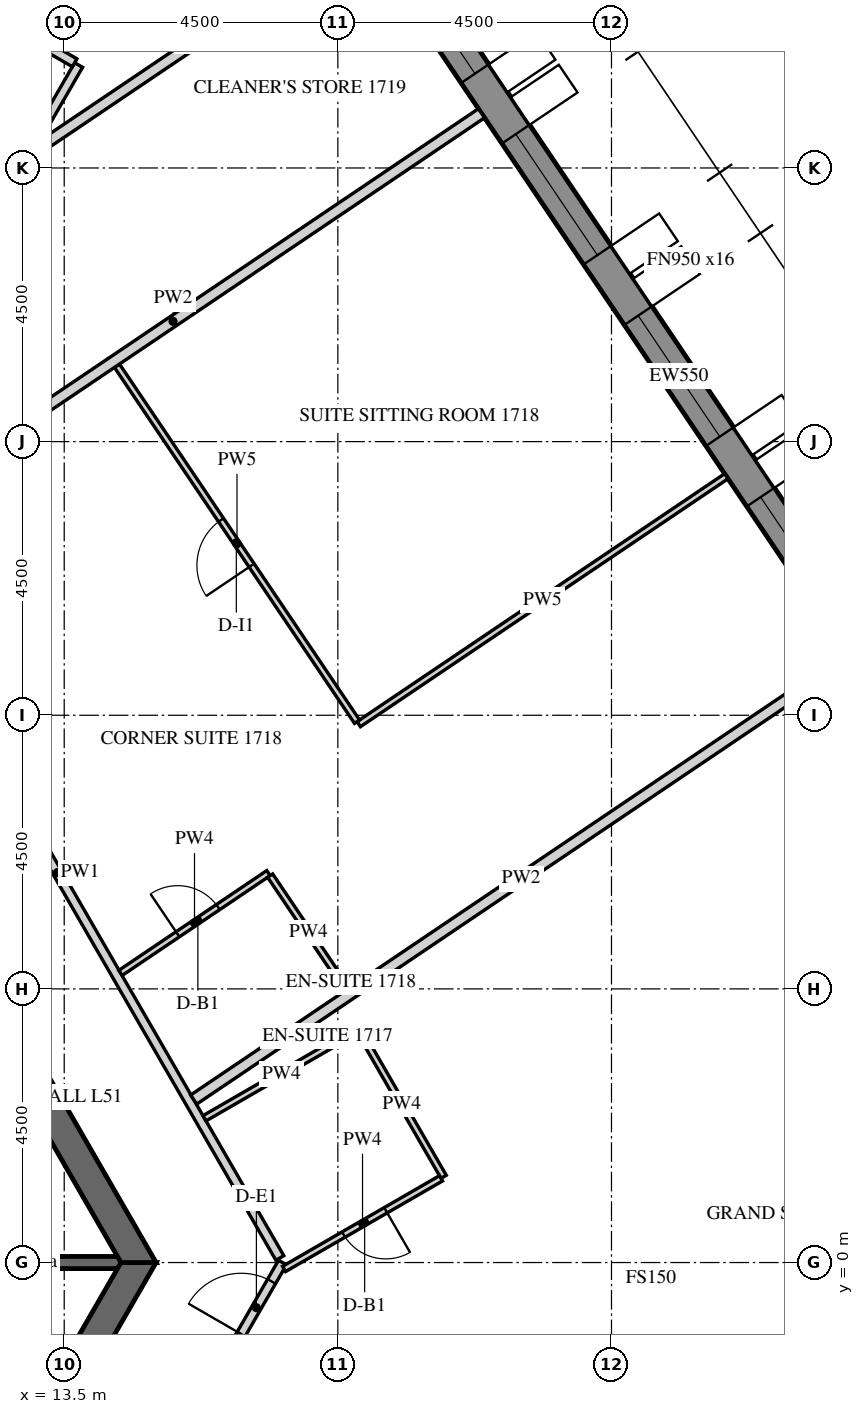
"""IFC4 building model, lengths in metres.
Left out: names, types, materials, properties, quantities, classifications, styles, units other than length and angle.
Written with IfcOpenShell. Run it as: python <this file> out.ifc"""

import sys

from ifc_helpers import new_model, si_unit, direction, frame, frame_2d, origin, place, context, subcontext, project, spatial, polyline, rectangle, outline, extrude, element, fill, save


model = new_model("IFC4")
c1 = context("Model", 3, precision=1e-05, world=origin(), true_north=direction((0.0, 1.0)))
c2 = subcontext(c1, "Body", "Model", "MODEL_VIEW")
j1 = project(units=[si_unit("LENGTHUNIT", "METRE"), si_unit("PLANEANGLEUNIT", "RADIAN")], contexts=[c1])
p1 = place(None, origin())
s1 = spatial("IfcSite", under=j1, at=p1, CompositionType="ELEMENT")
p2 = place(p1, origin())
s2 = spatial("IfcBuilding", under=s1, at=p2, CompositionType="ELEMENT")
p3 = place(p2, frame((0.0, 0.0, 215.1)))
s3 = spatial("IfcBuildingStorey", under=s2, at=p3, CompositionType="ELEMENT", Elevation=215.1)
p4 = place(p3, frame((17.63, -24.914, -0.15), z_axis=(0.0, 0.0, 1.0), x_axis=(0.499998569178, 0.866026229868, 0.0)))
e1 = element("IfcWall", 1, at=p4, inside=s3, PredefinedType="SOLIDWALL", context=c2, shape_type="SweptSolid", body=[
    extrude(outline(polyline([(-0.022, -0.275), (27.783, -0.275), (27.732, 0.275), (0.022, 0.275), (-0.022, -0.275)])), origin(), (0.0, 0.0, 1.0), 3.9),
])
p5 = place(p4, frame((1.879, 0.0, 1.05)))
e2 = element("IfcOpeningElement", 2, at=p5, cuts=e1, PredefinedType="OPENING", context=c2, shape_type="SweptSolid", body=[
    extrude(rectangle(XDim=2.4, YDim=2.4, at=frame_2d((1.2, 1.2))), frame((0.0, 0.285, 0.0), z_axis=(0.0, -1.0, 0.0), x_axis=(1.0, 0.0, 0.0)), (0.0, 0.0, 1.0), 0.57),
])
p6 = place(p4, frame((5.479, 0.0, 1.05)))
e3 = element("IfcOpeningElement", 3, at=p6, cuts=e1, PredefinedType="OPENING", context=c2, shape_type="SweptSolid", body=[
    extrude(rectangle(XDim=2.4, YDim=2.4, at=frame_2d((1.2, 1.2))), frame((0.0, 0.285, 0.0), z_axis=(0.0, -1.0, 0.0), x_axis=(1.0, 0.0, 0.0)), (0.0, 0.0, 1.0), 0.57),
])
p7 = place(p4, frame((9.079, 0.0, 1.05)))
e4 = element("IfcOpeningElement", 4, at=p7, cuts=e1, PredefinedType="OPENING", context=c2, shape_type="SweptSolid", body=[
    extrude(rectangle(XDim=2.4, YDim=2.4, at=frame_2d((1.2, 1.2))), frame((0.0, 0.285, 0.0), z_axis=(0.0, -1.0, 0.0), x_axis=(1.0, 0.0, 0.0)), (0.0, 0.0, 1.0), 0.57),
])
p8 = place(p4, frame((12.679, 0.0, 1.05)))
e5 = element("IfcOpeningElement", 5, at=p8, cuts=e1, PredefinedType="OPENING", context=c2, shape_type="SweptSolid", body=[
    extrude(rectangle(XDim=2.4, YDim=2.4, at=frame_2d((1.2, 1.2))), frame((0.0, 0.285, 0.0), z_axis=(0.0, -1.0, 0.0), x_axis=(1.0, 0.0, 0.0)), (0.0, 0.0, 1.0), 0.57),
])
p9 = place(p4, frame((16.279, 0.0, 1.05)))
e6 = element("IfcOpeningElement", 6, at=p9, cuts=e1, PredefinedType="OPENING", context=c2, shape_type="SweptSolid", body=[
    extrude(rectangle(XDim=2.4, YDim=2.4, at=frame_2d((1.2, 1.2))), frame((0.0, 0.285, 0.0), z_axis=(0.0, -1.0, 0.0), x_axis=(1.0, 0.0, 0.0)), (0.0, 0.0, 1.0), 0.57),
])
p10 = place(p4, frame((19.879, 0.0, 1.05)))
e7 = element("IfcOpeningElement", 7, at=p10, cuts=e1, PredefinedType="OPENING", context=c2, shape_type="SweptSolid", body=[
    extrude(rectangle(XDim=2.4, YDim=2.4, at=frame_2d((1.2, 1.2))), frame((0.0, 0.285, 0.0), z_axis=(0.0, -1.0, 0.0), x_axis=(1.0, 0.0, 0.0)), (0.0, 0.0, 1.0), 0.57),
])
p11 = place(p4, frame((23.479, 0.0, 1.05)))
e8 = element("IfcOpeningElement", 8, at=p11, cuts=e1, PredefinedType="OPENING", context=c2, shape_type="SweptSolid", body=[
    extrude(rectangle(XDim=2.4, YDim=2.4, at=frame_2d((1.2, 1.2))), frame((0.0, 0.285, 0.0), z_axis=(0.0, -1.0, 0.0), x_axis=(1.0, 0.0, 0.0)), (0.0, 0.0, 1.0), 0.57),
])
p12 = place(p3, frame((31.371, 3.071, -0.15), z_axis=(0.0, 0.0, 1.0), x_axis=(-0.559189891278, 0.829039604297, 0.0)))
e9 = element("IfcWall", 9, at=p12, inside=s3, PredefinedType="SOLIDWALL", context=c2, shape_type="SweptSolid", body=[
    extrude(outline(polyline([(-0.026, -0.275), (27.781, -0.275), (27.736, 0.275), (0.026, 0.275), (-0.026, -0.275)])), origin(), (0.0, 0.0, 1.0), 3.9),
])
p13 = place(p12, frame((1.879, 0.0, 1.05)))
e10 = element("IfcOpeningElement", 10, at=p13, cuts=e9, PredefinedType="OPENING", context=c2, shape_type="SweptSolid", body=[
    extrude(rectangle(XDim=2.4, YDim=2.4, at=frame_2d((1.2, 1.2))), frame((0.0, 0.285, 0.0), z_axis=(0.0, -1.0, 0.0), x_axis=(1.0, 0.0, 0.0)), (0.0, 0.0, 1.0), 0.57),
])
p14 = place(p12, frame((5.479, 0.0, 1.05)))
e11 = element("IfcOpeningElement", 11, at=p14, cuts=e9, PredefinedType="OPENING", context=c2, shape_type="SweptSolid", body=[
    extrude(rectangle(XDim=2.4, YDim=2.4, at=frame_2d((1.2, 1.2))), frame((0.0, 0.285, 0.0), z_axis=(0.0, -1.0, 0.0), x_axis=(1.0, 0.0, 0.0)), (0.0, 0.0, 1.0), 0.57),
])
p15 = place(p12, frame((9.079, 0.0, 1.05)))
e12 = element("IfcOpeningElement", 12, at=p15, cuts=e9, PredefinedType="OPENING", context=c2, shape_type="SweptSolid", body=[
    extrude(rectangle(XDim=2.4, YDim=2.4, at=frame_2d((1.2, 1.2))), frame((0.0, 0.285, 0.0), z_axis=(0.0, -1.0, 0.0), x_axis=(1.0, 0.0, 0.0)), (0.0, 0.0, 1.0), 0.57),
])
p16 = place(p12, frame((12.679, 0.0, 1.05)))
e13 = element("IfcOpeningElement", 13, at=p16, cuts=e9, PredefinedType="OPENING", context=c2, shape_type="SweptSolid", body=[
    extrude(rectangle(XDim=2.4, YDim=2.4, at=frame_2d((1.2, 1.2))), frame((0.0, 0.285, 0.0), z_axis=(0.0, -1.0, 0.0), x_axis=(1.0, 0.0, 0.0)), (0.0, 0.0, 1.0), 0.57),
])
p17 = place(p12, frame((16.279, 0.0, 1.05)))
e14 = element("IfcOpeningElement", 14, at=p17, cuts=e9, PredefinedType="OPENING", context=c2, shape_type="SweptSolid", body=[
    extrude(rectangle(XDim=2.4, YDim=2.4, at=frame_2d((1.2, 1.2))), frame((0.0, 0.285, 0.0), z_axis=(0.0, -1.0, 0.0), x_axis=(1.0, 0.0, 0.0)), (0.0, 0.0, 1.0), 0.57),
])
p18 = place(p12, frame((19.879, 0.0, 1.05)))
e15 = element("IfcOpeningElement", 15, at=p18, cuts=e9, PredefinedType="OPENING", context=c2, shape_type="SweptSolid", body=[
    extrude(rectangle(XDim=2.4, YDim=2.4, at=frame_2d((1.2, 1.2))), frame((0.0, 0.285, 0.0), z_axis=(0.0, -1.0, 0.0), x_axis=(1.0, 0.0, 0.0)), (0.0, 0.0, 1.0), 0.57),
])
p19 = place(p12, frame((23.479, 0.0, 1.05)))
e16 = element("IfcOpeningElement", 16, at=p19, cuts=e9, PredefinedType="OPENING", context=c2, shape_type="SweptSolid", body=[
    extrude(rectangle(XDim=2.4, YDim=2.4, at=frame_2d((1.2, 1.2))), frame((0.0, 0.285, 0.0), z_axis=(0.0, -1.0, 0.0), x_axis=(1.0, 0.0, 0.0)), (0.0, 0.0, 1.0), 0.57),
])
p20 = place(p3, frame((7.361, -12.75, -0.15), z_axis=(0.0, 0.0, 1.0), x_axis=(0.50000571537, 0.866022103989, 0.0)))
e17 = element("IfcWall", 17, at=p20, inside=s3, PredefinedType="SHEAR", context=c2, shape_type="SweptSolid", body=[
    extrude(outline(polyline([(-0.144, -0.25), (14.867, -0.25), (14.578, 0.25), (0.144, 0.25), (-0.144, -0.25)])), origin(), (0.0, 0.0, 1.0), 3.9),
])
p21 = place(p20, frame((6.49, 0.0, 0.15)))
e18 = element("IfcOpeningElement", 18, at=p21, cuts=e17, PredefinedType="OPENING", context=c2, shape_type="SweptSolid", body=[
    extrude(rectangle(XDim=1.8, YDim=2.4, at=frame_2d((0.9, 1.2))), frame((0.0, 0.26, 0.0), z_axis=(0.0, -1.0, 0.0), x_axis=(1.0, 0.0, 0.0)), (0.0, 0.0, 1.0), 0.52),
])
p22 = place(p3, frame((14.722, 0.0, -0.15), z_axis=(0.0, 0.0, 1.0), x_axis=(-0.50000571537, 0.866022103989, 0.0)))
e19 = element("IfcWall", 19, at=p22, inside=s3, PredefinedType="SHEAR", context=c2, shape_type="SweptSolid", body=[
    extrude(outline(polyline([(-0.144, -0.25), (14.867, -0.25), (14.578, 0.25), (0.144, 0.25), (-0.144, -0.25)])), origin(), (0.0, 0.0, 1.0), 3.9),
])
p23 = place(p22, frame((6.432, 0.0, 0.15)))
e20 = element("IfcOpeningElement", 20, at=p23, cuts=e19, PredefinedType="OPENING", context=c2, shape_type="SweptSolid", body=[
    extrude(rectangle(XDim=1.8, YDim=2.4, at=frame_2d((0.9, 1.2))), frame((0.0, 0.26, 0.0), z_axis=(0.0, -1.0, 0.0), x_axis=(1.0, 0.0, 0.0)), (0.0, 0.0, 1.0), 0.52),
])
p24 = place(p3, frame((7.506, 13.0, -0.15), z_axis=(0.0, 0.0, 1.0), x_axis=(0.499988271576, 0.866032175087, 0.0)))
e21 = element("IfcWall", 21, at=p24, inside=s3, PredefinedType="SHEAR", context=c2, shape_type="SweptSolid", body=[
    extrude(rectangle(XDim=15.424, YDim=0.5, at=frame_2d((7.712, 0.0))), origin(), (0.0, 0.0, 1.0), 3.9),
])
p25 = place(p24, frame((6.812, 0.0, 0.15)))
e22 = element("IfcOpeningElement", 22, at=p25, cuts=e21, PredefinedType="OPENING", context=c2, shape_type="SweptSolid", body=[
    extrude(rectangle(XDim=1.8, YDim=2.4, at=frame_2d((0.9, 1.2))), frame((0.0, 0.26, 0.0), z_axis=(0.0, -1.0, 0.0), x_axis=(1.0, 0.0, 0.0)), (0.0, 0.0, 1.0), 0.52),
])
p26 = place(p3, frame((11.547, 0.0, -0.15), z_axis=(0.0, 0.0, 1.0), x_axis=(1.0, 0.0, 0.0)))
e23 = element("IfcWall", 23, at=p26, inside=s3, PredefinedType="SHEAR", context=c2, shape_type="SweptSolid", body=[
    extrude(rectangle(XDim=2.887, YDim=0.2, at=frame_2d((1.443, 0.0))), origin(), (0.0, 0.0, 1.0), 3.9),
])
p27 = place(p3, frame((9.772, -12.675, 0.0), z_axis=(0.0, 0.0, 1.0), x_axis=(0.499996322767, 0.866027526826, 0.0)))
e24 = element("IfcWall", 24, at=p27, inside=s3, PredefinedType="PARTITIONING", context=c2, shape_type="SweptSolid", body=[
    extrude(rectangle(XDim=14.636, YDim=0.15, at=frame_2d((7.318, 0.0))), origin(), (0.0, 0.0, 1.0), 2.988),
])
p28 = place(p27, frame((5.361, 0.0, 0.0)))
e25 = element("IfcOpeningElement", 25, at=p28, cuts=e24, PredefinedType="OPENING", context=c2, shape_type="SweptSolid", body=[
    extrude(rectangle(XDim=1.0, YDim=2.1, at=frame_2d((0.5, 1.05))), frame((0.0, 0.085, 0.0), z_axis=(0.0, -1.0, 0.0), x_axis=(1.0, 0.0, 0.0)), (0.0, 0.0, 1.0), 0.17),
])
p29 = place(p27, frame((10.309, 0.0, 0.0)))
e26 = element("IfcOpeningElement", 26, at=p29, cuts=e24, PredefinedType="OPENING", context=c2, shape_type="SweptSolid", body=[
    extrude(rectangle(XDim=1.0, YDim=2.1, at=frame_2d((0.5, 1.05))), frame((0.0, 0.085, 0.0), z_axis=(0.0, -1.0, 0.0), x_axis=(1.0, 0.0, 0.0)), (0.0, 0.0, 1.0), 0.17),
])
p30 = place(p27, frame((13.278, 0.0, 0.0)))
e27 = element("IfcOpeningElement", 27, at=p30, cuts=e24, PredefinedType="OPENING", context=c2, shape_type="SweptSolid", body=[
    extrude(rectangle(XDim=1.0, YDim=2.1, at=frame_2d((0.5, 1.05))), frame((0.0, 0.085, 0.0), z_axis=(0.0, -1.0, 0.0), x_axis=(1.0, 0.0, 0.0)), (0.0, 0.0, 1.0), 0.17),
])
p31 = place(p3, frame((17.046, 0.075, 0.0), z_axis=(0.0, 0.0, 1.0), x_axis=(-0.500008833422, 0.866020303746, 0.0)))
e28 = element("IfcWall", 28, at=p31, inside=s3, PredefinedType="PARTITIONING", context=c2, shape_type="SweptSolid", body=[
    extrude(rectangle(XDim=14.636, YDim=0.15, at=frame_2d((7.318, 0.0))), origin(), (0.0, 0.0, 1.0), 2.988),
])
p32 = place(p31, frame((9.07, 0.0, 0.0)))
e29 = element("IfcOpeningElement", 29, at=p32, cuts=e28, PredefinedType="OPENING", context=c2, shape_type="SweptSolid", body=[
    extrude(rectangle(XDim=1.0, YDim=2.1, at=frame_2d((0.5, 1.05))), frame((0.0, 0.085, 0.0), z_axis=(0.0, -1.0, 0.0), x_axis=(1.0, 0.0, 0.0)), (0.0, 0.0, 1.0), 0.17),
])
p33 = place(p3, frame((9.772, 12.825, 0.0), z_axis=(0.0, 0.0, 1.0), x_axis=(0.499989830942, 0.866031274813, 0.0)))
e30 = element("IfcWall", 30, at=p33, inside=s3, PredefinedType="PARTITIONING", context=c2, shape_type="SweptSolid", body=[
    extrude(rectangle(XDim=7.93, YDim=0.15, at=frame_2d((3.965, 0.0))), origin(), (0.0, 0.0, 1.0), 2.988),
])
p34 = place(p33, frame((2.552, 0.0, 0.0)))
e31 = element("IfcOpeningElement", 31, at=p34, cuts=e30, PredefinedType="OPENING", context=c2, shape_type="SweptSolid", body=[
    extrude(rectangle(XDim=1.0, YDim=2.1, at=frame_2d((0.5, 1.05))), frame((0.0, 0.085, 0.0), z_axis=(0.0, -1.0, 0.0), x_axis=(1.0, 0.0, 0.0)), (0.0, 0.0, 1.0), 0.17),
])
p35 = place(p3, frame((13.672, 19.73, 0.0), z_axis=(0.0, 0.0, 1.0), x_axis=(-0.866074815912, 0.499914405916, 0.0)))
e32 = element("IfcWall", 32, at=p35, inside=s3, PredefinedType="PARTITIONING", context=c2, shape_type="SweptSolid", body=[
    extrude(rectangle(XDim=1.725, YDim=0.15, at=frame_2d((0.862, 0.0))), origin(), (0.0, 0.0, 1.0), 2.988),
])
p36 = place(p35, frame((0.575, 0.0, 0.0)))
e33 = element("IfcOpeningElement", 33, at=p36, cuts=e32, PredefinedType="OPENING", context=c2, shape_type="SweptSolid", body=[
    extrude(rectangle(XDim=1.0, YDim=2.1, at=frame_2d((0.5, 1.05))), frame((0.0, 0.085, 0.0), z_axis=(0.0, -1.0, 0.0), x_axis=(1.0, 0.0, 0.0)), (0.0, 0.0, 1.0), 0.17),
])
p37 = place(p3, frame((15.807, 2.372, 0.0), z_axis=(0.0, 0.0, 1.0), x_axis=(0.86601045545, 0.500025890382, 0.0)))
e34 = element("IfcWall", 34, at=p37, inside=s3, PredefinedType="PARTITIONING", context=c2, shape_type="SweptSolid", body=[
    extrude(rectangle(XDim=2.925, YDim=0.1, at=frame_2d((1.462, 0.0))), origin(), (0.0, 0.0, 1.0), 2.988),
])
p38 = place(p3, frame((18.365, 3.791, 0.0), z_axis=(0.0, 0.0, 1.0), x_axis=(0.499996545922, -0.866027397988, 0.0)))
e35 = element("IfcWall", 35, at=p38, inside=s3, PredefinedType="PARTITIONING", context=c2, shape_type="SweptSolid", body=[
    extrude(rectangle(XDim=2.75, YDim=0.1, at=frame_2d((1.375, 0.0))), origin(), (0.0, 0.0, 1.0), 2.988),
])
p39 = place(p3, frame((19.697, 1.385, 0.0), z_axis=(0.0, 0.0, 1.0), x_axis=(-0.866036909293, -0.499980071345, 0.0)))
e36 = element("IfcWall", 36, at=p39, inside=s3, PredefinedType="PARTITIONING", context=c2, shape_type="SweptSolid", body=[
    extrude(rectangle(XDim=2.98, YDim=0.1, at=frame_2d((1.49, 0.0))), origin(), (0.0, 0.0, 1.0), 2.988),
])
p40 = place(p39, frame((1.05, 0.0, 0.0)))
e37 = element("IfcOpeningElement", 37, at=p40, cuts=e36, PredefinedType="OPENING", context=c2, shape_type="SweptSolid", body=[
    extrude(rectangle(XDim=0.8, YDim=2.1, at=frame_2d((0.4, 1.05))), frame((0.0, 0.06, 0.0), z_axis=(0.0, -1.0, 0.0), x_axis=(1.0, 0.0, 0.0)), (0.0, 0.0, 1.0), 0.12),
])
p41 = place(p3, frame((26.402, 9.946, 0.0), z_axis=(0.0, 0.0, 1.0), x_axis=(-0.829032022697, -0.559201131386, 0.0)))
e38 = element("IfcWall", 38, at=p41, inside=s3, PredefinedType="PARTITIONING", context=c2, shape_type="SweptSolid", body=[
    extrude(rectangle(XDim=12.995, YDim=0.18, at=frame_2d((6.497, 0.0))), origin(), (0.0, 0.0, 1.0), 2.988),
])
p42 = place(p3, frame((14.426, 4.763, 0.0), z_axis=(0.0, 0.0, 1.0), x_axis=(0.829055983973, 0.559165606451, 0.0)))
e39 = element("IfcWall", 39, at=p42, inside=s3, PredefinedType="PARTITIONING", context=c2, shape_type="SweptSolid", body=[
    extrude(rectangle(XDim=2.935, YDim=0.1, at=frame_2d((1.467, 0.0))), origin(), (0.0, 0.0, 1.0), 2.988),
])
p43 = place(p42, frame((1.135, 0.0, 0.0)))
e40 = element("IfcOpeningElement", 40, at=p43, cuts=e39, PredefinedType="OPENING", context=c2, shape_type="SweptSolid", body=[
    extrude(rectangle(XDim=0.8, YDim=2.1, at=frame_2d((0.4, 1.05))), frame((0.0, 0.06, 0.0), z_axis=(0.0, -1.0, 0.0), x_axis=(1.0, 0.0, 0.0)), (0.0, 0.0, 1.0), 0.12),
])
p44 = place(p3, frame((16.887, 6.363, 0.0), z_axis=(0.0, 0.0, 1.0), x_axis=(0.559179660023, -0.829046505219, 0.0)))
e41 = element("IfcWall", 41, at=p44, inside=s3, PredefinedType="PARTITIONING", context=c2, shape_type="SweptSolid", body=[
    extrude(rectangle(XDim=2.26, YDim=0.1, at=frame_2d((1.13, 0.0))), origin(), (0.0, 0.0, 1.0), 2.988),
])
p45 = place(p3, frame((24.389, 12.931, 0.0), z_axis=(0.0, 0.0, 1.0), x_axis=(-0.829029895244, -0.559204285383, 0.0)))
e42 = element("IfcWall", 42, at=p45, inside=s3, PredefinedType="PARTITIONING", context=c2, shape_type="SweptSolid", body=[
    extrude(rectangle(XDim=7.292, YDim=0.1, at=frame_2d((3.646, 0.0))), origin(), (0.0, 0.0, 1.0), 2.988),
])
p46 = place(p3, frame((18.315, 8.895, 0.0), z_axis=(0.0, 0.0, 1.0), x_axis=(-0.559177045947, 0.829048268369, 0.0)))
e43 = element("IfcWall", 43, at=p46, inside=s3, PredefinedType="PARTITIONING", context=c2, shape_type="SweptSolid", body=[
    extrude(rectangle(XDim=7.06, YDim=0.1, at=frame_2d((3.53, 0.0))), origin(), (0.0, 0.0, 1.0), 2.988),
])
p47 = place(p46, frame((3.1, 0.0, 0.0)))
e44 = element("IfcOpeningElement", 44, at=p47, cuts=e43, PredefinedType="OPENING", context=c2, shape_type="SweptSolid", body=[
    extrude(rectangle(XDim=0.9, YDim=2.1, at=frame_2d((0.45, 1.05))), frame((0.0, 0.06, 0.0), z_axis=(0.0, -1.0, 0.0), x_axis=(1.0, 0.0, 0.0)), (0.0, 0.0, 1.0), 0.12),
])
p48 = place(p3, frame((20.363, 18.9, 0.0), z_axis=(0.0, 0.0, 1.0), x_axis=(-0.829030622766, -0.559203206819, 0.0)))
e45 = element("IfcWall", 45, at=p48, inside=s3, PredefinedType="PARTITIONING", context=c2, shape_type="SweptSolid", body=[
    extrude(rectangle(XDim=12.239, YDim=0.18, at=frame_2d((6.12, 0.0))), origin(), (0.0, 0.0, 1.0), 2.988),
])
p49 = place(p3, frame((18.35, 21.884, 0.0), z_axis=(0.0, 0.0, 1.0), x_axis=(-0.829047205772, -0.559178621374, 0.0)))
e46 = element("IfcWall", 46, at=p49, inside=s3, PredefinedType="PARTITIONING", context=c2, shape_type="SweptSolid", body=[
    extrude(rectangle(XDim=6.442, YDim=0.18, at=frame_2d((3.221, 0.0))), origin(), (0.0, 0.0, 1.0), 2.988),
])
p50 = place(p15, frame((0.0, 0.205, 0.0)))
e47 = element("IfcWindow", 47, at=p50, inside=s3, PartitioningType="DOUBLE_PANEL_VERTICAL", PredefinedType="WINDOW", context=c2, shape_type="SweptSolid", body=[
    extrude(rectangle(XDim=2.4, YDim=2.4, at=frame_2d((1.2, 1.2))), frame((0.0, 0.03, 0.0), z_axis=(0.0, -1.0, 0.0), x_axis=(1.0, 0.0, 0.0)), (0.0, 0.0, 1.0), 0.06),
])
fill(e12, e47)
p51 = place(p16, frame((0.0, 0.205, 0.0)))
e48 = element("IfcWindow", 48, at=p51, inside=s3, PartitioningType="DOUBLE_PANEL_VERTICAL", PredefinedType="WINDOW", context=c2, shape_type="SweptSolid", body=[
    extrude(rectangle(XDim=2.4, YDim=2.4, at=frame_2d((1.2, 1.2))), frame((0.0, 0.03, 0.0), z_axis=(0.0, -1.0, 0.0), x_axis=(1.0, 0.0, 0.0)), (0.0, 0.0, 1.0), 0.06),
])
fill(e13, e48)
p52 = place(p17, frame((0.0, 0.205, 0.0)))
e49 = element("IfcWindow", 49, at=p52, inside=s3, PartitioningType="DOUBLE_PANEL_VERTICAL", PredefinedType="WINDOW", context=c2, shape_type="SweptSolid", body=[
    extrude(rectangle(XDim=2.4, YDim=2.4, at=frame_2d((1.2, 1.2))), frame((0.0, 0.03, 0.0), z_axis=(0.0, -1.0, 0.0), x_axis=(1.0, 0.0, 0.0)), (0.0, 0.0, 1.0), 0.06),
])
fill(e14, e49)
p53 = place(p18, frame((0.0, 0.205, 0.0)))
e50 = element("IfcWindow", 50, at=p53, inside=s3, PartitioningType="DOUBLE_PANEL_VERTICAL", PredefinedType="WINDOW", context=c2, shape_type="SweptSolid", body=[
    extrude(rectangle(XDim=2.4, YDim=2.4, at=frame_2d((1.2, 1.2))), frame((0.0, 0.03, 0.0), z_axis=(0.0, -1.0, 0.0), x_axis=(1.0, 0.0, 0.0)), (0.0, 0.0, 1.0), 0.06),
])
fill(e15, e50)
p54 = place(p30, origin())
e51 = element("IfcDoor", 51, at=p54, inside=s3, OperationType="SINGLE_SWING_LEFT", PredefinedType="DOOR", context=c2, shape_type="SweptSolid", body=[
    extrude(rectangle(XDim=1.0, YDim=2.1, at=frame_2d((0.5, 1.05))), frame((0.0, 0.025, 0.0), z_axis=(0.0, -1.0, 0.0), x_axis=(1.0, 0.0, 0.0)), (0.0, 0.0, 1.0), 0.05),
])
fill(e27, e51)
p55 = place(p40, origin())
e52 = element("IfcDoor", 52, at=p55, inside=s3, OperationType="SINGLE_SWING_RIGHT", PredefinedType="DOOR", context=c2, shape_type="SweptSolid", body=[
    extrude(rectangle(XDim=0.8, YDim=2.1, at=frame_2d((0.4, 1.05))), frame((0.0, 0.025, 0.0), z_axis=(0.0, -1.0, 0.0), x_axis=(1.0, 0.0, 0.0)), (0.0, 0.0, 1.0), 0.05),
])
fill(e37, e52)
p56 = place(p43, origin())
e53 = element("IfcDoor", 53, at=p56, inside=s3, OperationType="SINGLE_SWING_LEFT", PredefinedType="DOOR", context=c2, shape_type="SweptSolid", body=[
    extrude(rectangle(XDim=0.8, YDim=2.1, at=frame_2d((0.4, 1.05))), frame((0.0, 0.025, 0.0), z_axis=(0.0, -1.0, 0.0), x_axis=(1.0, 0.0, 0.0)), (0.0, 0.0, 1.0), 0.05),
])
fill(e40, e53)
p57 = place(p47, origin())
e54 = element("IfcDoor", 54, at=p57, inside=s3, OperationType="SINGLE_SWING_LEFT", PredefinedType="DOOR", context=c2, shape_type="SweptSolid", body=[
    extrude(rectangle(XDim=0.9, YDim=2.1, at=frame_2d((0.45, 1.05))), frame((0.0, 0.025, 0.0), z_axis=(0.0, -1.0, 0.0), x_axis=(1.0, 0.0, 0.0)), (0.0, 0.0, 1.0), 0.05),
])
fill(e44, e54)
save(model, sys.argv[1])
